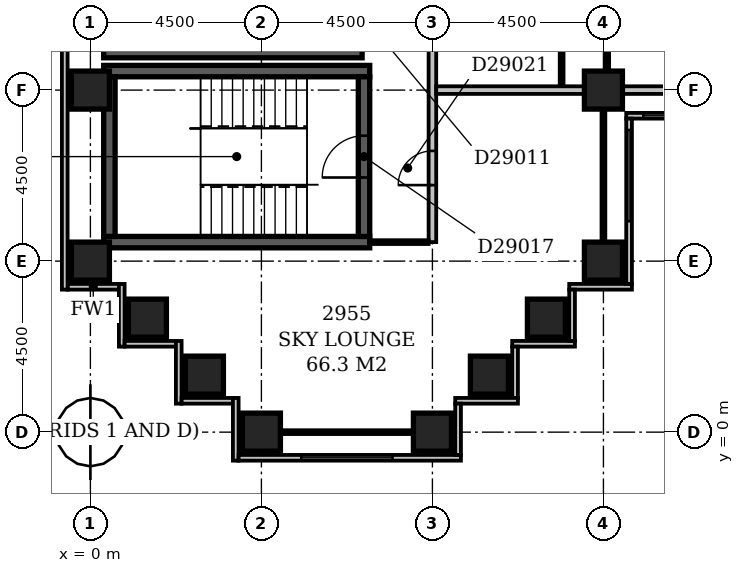
"""IFC4 building model, lengths in metres.
Left out: names, types, materials, properties, quantities, classifications, styles, units other than length and angle.
Written with IfcOpenShell. Run it as: python <this file> out.ifc"""

import sys

from ifc_helpers import new_model, si_unit, direction, frame, frame_2d, origin, origin_2d, place, context, subcontext, project, spatial, rectangle, extrude, element, fill, save


model = new_model("IFC4")
c1 = context("Model", 3, precision=1e-05, world=origin(), true_north=direction((0.0, 1.0)))
c2 = subcontext(c1, "Body", "Model", "MODEL_VIEW")
j1 = project(units=[si_unit("LENGTHUNIT", "METRE"), si_unit("PLANEANGLEUNIT", "RADIAN")], contexts=[c1])
p1 = place(None, origin())
s1 = spatial("IfcSite", under=j1, at=p1, CompositionType="ELEMENT")
p2 = place(p1, origin())
s2 = spatial("IfcBuilding", under=s1, at=p2, CompositionType="ELEMENT")
p3 = place(p2, frame((0.0, 0.0, 119.6)))
s3 = spatial("IfcBuildingStorey", under=s2, at=p3, CompositionType="ELEMENT", Elevation=119.6)
for number, where, z_axis, x_axis in (
    (1, (0.35, 5.0, -0.3), (0.0, 0.0, 1.0), (1.0, 0.0, 0.0)),
    (2, (0.35, 9.5, -0.3), (0.0, 0.0, 1.0), (1.0, 0.0, 0.0)),
):
    element("IfcWall", number, at=place(p3, frame(where, z_axis=z_axis, x_axis=x_axis)), inside=s3, PredefinedType="SHEAR", context=c2, shape_type="SweptSolid", body=[
        extrude(rectangle(XDim=7.0, YDim=0.3, at=frame_2d((3.5, 0.0))), origin(), (0.0, 0.0, 1.0), 3.6),
    ])
p4 = place(p3, frame((0.35, 10.0, -0.3), z_axis=(0.0, 0.0, 1.0), x_axis=(1.0, 0.0, 0.0)))
e3 = element("IfcWall", 3, at=p4, inside=s3, PredefinedType="SHEAR", context=c2, shape_type="SweptSolid", body=[
    extrude(rectangle(XDim=6.8, YDim=0.3, at=frame_2d((3.4, 0.0))), origin(), (0.0, 0.0, 1.0), 3.6),
])
p5 = place(p3, frame((0.5, 5.15, -0.3), z_axis=(0.0, 0.0, 1.0), x_axis=(0.0, 1.0, 0.0)))
e4 = element("IfcWall", 4, at=p5, inside=s3, PredefinedType="SHEAR", context=c2, shape_type="SweptSolid", body=[
    extrude(rectangle(XDim=4.2, YDim=0.3, at=frame_2d((2.1, 0.0))), origin(), (0.0, 0.0, 1.0), 3.6),
])
p6 = place(p3, frame((7.2, 5.15, -0.3), z_axis=(0.0, 0.0, 1.0), x_axis=(0.0, 1.0, 0.0)))
e5 = element("IfcWall", 5, at=p6, inside=s3, PredefinedType="SHEAR", context=c2, shape_type="SweptSolid", body=[
    extrude(rectangle(XDim=4.2, YDim=0.3, at=frame_2d((2.1, 0.0))), origin(), (0.0, 0.0, 1.0), 3.6),
])
p7 = place(p6, frame((1.55, 0.0, 0.3)))
e6 = element("IfcOpeningElement", 6, at=p7, cuts=e5, PredefinedType="OPENING", context=c2, shape_type="SweptSolid", body=[
    extrude(rectangle(XDim=1.1, YDim=2.1, at=frame_2d((0.55, 1.05))), frame((0.0, 0.162, 0.0), z_axis=(0.0, -1.0, 0.0), x_axis=(1.0, 0.0, 0.0)), (0.0, 0.0, 1.0), 0.324),
])
for number, where, z_axis, x_axis in (
    (7, (4.5, 0.0, -0.3), (0.0, 0.0, 1.0), (1.0, 0.0, 0.0)),
    (8, (9.0, 0.0, -0.3), (0.0, 0.0, 1.0), (1.0, 0.0, 0.0)),
    (9, (3.0, 1.5, -0.3), (0.0, 0.0, 1.0), (1.0, 0.0, 0.0)),
    (10, (10.5, 1.5, -0.3), (0.0, 0.0, 1.0), (1.0, 0.0, 0.0)),
    (11, (1.5, 3.0, -0.3), (0.0, 0.0, 1.0), (1.0, 0.0, 0.0)),
    (12, (12.0, 3.0, -0.3), (0.0, 0.0, 1.0), (1.0, 0.0, 0.0)),
    (13, (0.0, 4.5, -0.3), (0.0, 0.0, 1.0), (1.0, 0.0, 0.0)),
    (14, (13.5, 4.5, -0.3), (0.0, 0.0, 1.0), (1.0, 0.0, 0.0)),
    (15, (0.0, 9.0, -0.3), (0.0, 0.0, 1.0), (1.0, 0.0, 0.0)),
    (16, (13.5, 9.0, -0.3), (0.0, 0.0, 1.0), (1.0, 0.0, 0.0)),
):
    element("IfcColumn", number, at=place(p3, frame(where, z_axis=z_axis, x_axis=x_axis)), inside=s3, PredefinedType="COLUMN", context=c2, shape_type="SweptSolid", body=[
        extrude(rectangle(XDim=1.0, YDim=1.0, at=origin_2d()), origin(), (0.0, 0.0, 1.0), 3.6),
    ])
p8 = place(p3, frame((9.675, -0.6, 0.0), z_axis=(0.0, 0.0, 1.0), x_axis=(0.0, 1.0, 0.0)))
e17 = element("IfcWall", 17, at=p8, inside=s3, PredefinedType="STANDARD", context=c2, shape_type="SweptSolid", body=[
    extrude(rectangle(XDim=1.35, YDim=0.15, at=frame_2d((0.675, 0.0))), origin(), (0.0, 0.0, 1.0), 2.7),
])
p9 = place(p3, frame((9.6, 0.825, 0.0), z_axis=(0.0, 0.0, 1.0), x_axis=(1.0, 0.0, 0.0)))
e18 = element("IfcWall", 18, at=p9, inside=s3, PredefinedType="STANDARD", context=c2, shape_type="SweptSolid", body=[
    extrude(rectangle(XDim=1.65, YDim=0.15, at=frame_2d((0.825, 0.0))), origin(), (0.0, 0.0, 1.0), 2.7),
])
p10 = place(p3, frame((11.175, 0.9, 0.0), z_axis=(0.0, 0.0, 1.0), x_axis=(0.0, 1.0, 0.0)))
e19 = element("IfcWall", 19, at=p10, inside=s3, PredefinedType="STANDARD", context=c2, shape_type="SweptSolid", body=[
    extrude(rectangle(XDim=1.35, YDim=0.15, at=frame_2d((0.675, 0.0))), origin(), (0.0, 0.0, 1.0), 2.7),
])
p11 = place(p3, frame((11.1, 2.325, 0.0), z_axis=(0.0, 0.0, 1.0), x_axis=(1.0, 0.0, 0.0)))
e20 = element("IfcWall", 20, at=p11, inside=s3, PredefinedType="STANDARD", context=c2, shape_type="SweptSolid", body=[
    extrude(rectangle(XDim=1.65, YDim=0.15, at=frame_2d((0.825, 0.0))), origin(), (0.0, 0.0, 1.0), 2.7),
])
p12 = place(p3, frame((12.675, 2.4, 0.0), z_axis=(0.0, 0.0, 1.0), x_axis=(0.0, 1.0, 0.0)))
e21 = element("IfcWall", 21, at=p12, inside=s3, PredefinedType="STANDARD", context=c2, shape_type="SweptSolid", body=[
    extrude(rectangle(XDim=1.35, YDim=0.15, at=frame_2d((0.675, 0.0))), origin(), (0.0, 0.0, 1.0), 2.7),
])
p13 = place(p3, frame((12.6, 3.825, 0.0), z_axis=(0.0, 0.0, 1.0), x_axis=(1.0, 0.0, 0.0)))
e22 = element("IfcWall", 22, at=p13, inside=s3, PredefinedType="STANDARD", context=c2, shape_type="SweptSolid", body=[
    extrude(rectangle(XDim=1.65, YDim=0.15, at=frame_2d((0.825, 0.0))), origin(), (0.0, 0.0, 1.0), 2.7),
])
p14 = place(p3, frame((14.175, 3.9, 0.0), z_axis=(0.0, 0.0, 1.0), x_axis=(0.0, 1.0, 0.0)))
e23 = element("IfcWall", 23, at=p14, inside=s3, PredefinedType="STANDARD", context=c2, shape_type="SweptSolid", body=[
    extrude(rectangle(XDim=4.35, YDim=0.15, at=frame_2d((2.175, 0.0))), origin(), (0.0, 0.0, 1.0), 2.7),
])
p15 = place(p14, frame((1.65, 0.0, 0.6)))
e24 = element("IfcOpeningElement", 24, at=p15, cuts=e23, PredefinedType="OPENING", context=c2, shape_type="SweptSolid", body=[
    extrude(rectangle(XDim=2.4, YDim=1.8, at=frame_2d((1.2, 0.9))), frame((0.0, 0.087, 0.0), z_axis=(0.0, -1.0, 0.0), x_axis=(1.0, 0.0, 0.0)), (0.0, 0.0, 1.0), 0.174),
])
p16 = place(p3, frame((14.1, 8.325, 0.0), z_axis=(0.0, 0.0, 1.0), x_axis=(1.0, 0.0, 0.0)))
e25 = element("IfcWall", 25, at=p16, inside=s3, PredefinedType="STANDARD", context=c2, shape_type="SweptSolid", body=[
    extrude(rectangle(XDim=4.65, YDim=0.15, at=frame_2d((2.325, 0.0))), origin(), (0.0, 0.0, 1.0), 2.7),
])
p17 = place(p16, frame((0.45, 0.0, 0.6)))
e26 = element("IfcOpeningElement", 26, at=p17, cuts=e25, PredefinedType="OPENING", context=c2, shape_type="SweptSolid", body=[
    extrude(rectangle(XDim=2.4, YDim=1.8, at=frame_2d((1.2, 0.9))), frame((0.0, 0.087, 0.0), z_axis=(0.0, -1.0, 0.0), x_axis=(1.0, 0.0, 0.0)), (0.0, 0.0, 1.0), 0.174),
])
p18 = place(p3, frame((-0.675, 59.1, 0.0), z_axis=(0.0, 0.0, 1.0), x_axis=(0.0, -1.0, 0.0)))
e27 = element("IfcWall", 27, at=p18, inside=s3, PredefinedType="STANDARD", context=c2, shape_type="SweptSolid", body=[
    extrude(rectangle(XDim=55.35, YDim=0.15, at=frame_2d((27.675, 0.0))), origin(), (0.0, 0.0, 1.0), 2.7),
])
p19 = place(p18, frame((43.347, 0.0, 0.6)))
e28 = element("IfcOpeningElement", 28, at=p19, cuts=e27, PredefinedType="OPENING", context=c2, shape_type="SweptSolid", body=[
    extrude(rectangle(XDim=1.5, YDim=1.8, at=frame_2d((0.75, 0.9))), frame((0.0, 0.087, 0.0), z_axis=(0.0, -1.0, 0.0), x_axis=(1.0, 0.0, 0.0)), (0.0, 0.0, 1.0), 0.174),
])
p20 = place(p3, frame((-0.6, 3.825, 0.0), z_axis=(0.0, 0.0, 1.0), x_axis=(1.0, 0.0, 0.0)))
e29 = element("IfcWall", 29, at=p20, inside=s3, PredefinedType="STANDARD", context=c2, shape_type="SweptSolid", body=[
    extrude(rectangle(XDim=1.35, YDim=0.15, at=frame_2d((0.675, 0.0))), origin(), (0.0, 0.0, 1.0), 2.7),
])
p21 = place(p3, frame((0.825, 3.9, 0.0), z_axis=(0.0, 0.0, 1.0), x_axis=(0.0, -1.0, 0.0)))
e30 = element("IfcWall", 30, at=p21, inside=s3, PredefinedType="STANDARD", context=c2, shape_type="SweptSolid", body=[
    extrude(rectangle(XDim=1.65, YDim=0.15, at=frame_2d((0.825, 0.0))), origin(), (0.0, 0.0, 1.0), 2.7),
])
p22 = place(p3, frame((0.9, 2.325, 0.0), z_axis=(0.0, 0.0, 1.0), x_axis=(1.0, 0.0, 0.0)))
e31 = element("IfcWall", 31, at=p22, inside=s3, PredefinedType="STANDARD", context=c2, shape_type="SweptSolid", body=[
    extrude(rectangle(XDim=1.35, YDim=0.15, at=frame_2d((0.675, 0.0))), origin(), (0.0, 0.0, 1.0), 2.7),
])
p23 = place(p3, frame((2.325, 2.4, 0.0), z_axis=(0.0, 0.0, 1.0), x_axis=(0.0, -1.0, 0.0)))
e32 = element("IfcWall", 32, at=p23, inside=s3, PredefinedType="STANDARD", context=c2, shape_type="SweptSolid", body=[
    extrude(rectangle(XDim=1.65, YDim=0.15, at=frame_2d((0.825, 0.0))), origin(), (0.0, 0.0, 1.0), 2.7),
])
p24 = place(p3, frame((2.4, 0.825, 0.0), z_axis=(0.0, 0.0, 1.0), x_axis=(1.0, 0.0, 0.0)))
e33 = element("IfcWall", 33, at=p24, inside=s3, PredefinedType="STANDARD", context=c2, shape_type="SweptSolid", body=[
    extrude(rectangle(XDim=1.35, YDim=0.15, at=frame_2d((0.675, 0.0))), origin(), (0.0, 0.0, 1.0), 2.7),
])
p25 = place(p3, frame((3.825, 0.9, 0.0), z_axis=(0.0, 0.0, 1.0), x_axis=(0.0, -1.0, 0.0)))
e34 = element("IfcWall", 34, at=p25, inside=s3, PredefinedType="STANDARD", context=c2, shape_type="SweptSolid", body=[
    extrude(rectangle(XDim=1.65, YDim=0.15, at=frame_2d((0.825, 0.0))), origin(), (0.0, 0.0, 1.0), 2.7),
])
p26 = place(p3, frame((3.9, -0.675, 0.0), z_axis=(0.0, 0.0, 1.0), x_axis=(1.0, 0.0, 0.0)))
e35 = element("IfcWall", 35, at=p26, inside=s3, PredefinedType="STANDARD", context=c2, shape_type="SweptSolid", body=[
    extrude(rectangle(XDim=5.85, YDim=0.15, at=frame_2d((2.925, 0.0))), origin(), (0.0, 0.0, 1.0), 2.7),
])
p27 = place(p26, frame((1.65, 0.0, 0.6)))
e36 = element("IfcOpeningElement", 36, at=p27, cuts=e35, PredefinedType="OPENING", context=c2, shape_type="SweptSolid", body=[
    extrude(rectangle(XDim=2.4, YDim=1.8, at=frame_2d((1.2, 0.9))), frame((0.0, 0.087, 0.0), z_axis=(0.0, -1.0, 0.0), x_axis=(1.0, 0.0, 0.0)), (0.0, 0.0, 1.0), 0.174),
])
p28 = place(p3, frame((5.0, 0.0, 0.0), z_axis=(0.0, 0.0, 1.0), x_axis=(1.0, 0.0, 0.0)))
e37 = element("IfcWall", 37, at=p28, inside=s3, PredefinedType="PARTITIONING", context=c2, shape_type="SweptSolid", body=[
    extrude(rectangle(XDim=3.5, YDim=0.1, at=frame_2d((1.75, 0.0))), origin(), (0.0, 0.0, 1.0), 2.7),
])
p29 = place(p3, frame((0.0, 4.5, 0.0), z_axis=(0.0, 0.0, 1.0), x_axis=(0.0, 1.0, 0.0)))
e38 = element("IfcWall", 38, at=p29, inside=s3, PredefinedType="PARTITIONING", context=c2, shape_type="SweptSolid", body=[
    extrude(rectangle(XDim=0.5, YDim=0.1, at=frame_2d((0.25, 0.0))), origin(), (0.0, 0.0, 1.0), 2.7),
])
p30 = place(p3, frame((7.349, 5.0, 0.0), z_axis=(0.0, 0.0, 1.0), x_axis=(1.0, 0.0, 0.0)))
e39 = element("IfcWall", 39, at=p30, inside=s3, PredefinedType="PARTITIONING", context=c2, shape_type="SweptSolid", body=[
    extrude(rectangle(XDim=1.551, YDim=0.1, at=frame_2d((0.775, 0.0))), origin(), (0.0, 0.0, 1.0), 3.3),
])
p31 = place(p3, frame((9.0, 5.0, 0.0), z_axis=(0.0, 0.0, 1.0), x_axis=(0.0, 1.0, 0.0)))
e40 = element("IfcWall", 40, at=p31, inside=s3, PredefinedType="PARTITIONING", context=c2, shape_type="SweptSolid", body=[
    extrude(rectangle(XDim=27.75, YDim=0.2, at=frame_2d((13.875, 0.0))), origin(), (0.0, 0.0, 1.0), 3.3),
])
p32 = place(p31, frame((17.8, 0.0, 0.0)))
e41 = element("IfcOpeningElement", 41, at=p32, cuts=e40, PredefinedType="OPENING", context=c2, shape_type="SweptSolid", body=[
    extrude(rectangle(XDim=1.0, YDim=2.1, at=frame_2d((0.5, 1.05))), frame((0.0, 0.112, 0.0), z_axis=(0.0, -1.0, 0.0), x_axis=(1.0, 0.0, 0.0)), (0.0, 0.0, 1.0), 0.224),
])
p33 = place(p31, frame((14.95, 0.0, 0.0)))
e42 = element("IfcOpeningElement", 42, at=p33, cuts=e40, PredefinedType="OPENING", context=c2, shape_type="SweptSolid", body=[
    extrude(rectangle(XDim=1.0, YDim=2.1, at=frame_2d((0.5, 1.05))), frame((0.0, 0.112, 0.0), z_axis=(0.0, -1.0, 0.0), x_axis=(1.0, 0.0, 0.0)), (0.0, 0.0, 1.0), 0.224),
])
p34 = place(p31, frame((9.3, 0.0, 0.0)))
e43 = element("IfcOpeningElement", 43, at=p34, cuts=e40, PredefinedType="OPENING", context=c2, shape_type="SweptSolid", body=[
    extrude(rectangle(XDim=1.0, YDim=2.1, at=frame_2d((0.5, 1.05))), frame((0.0, 0.112, 0.0), z_axis=(0.0, -1.0, 0.0), x_axis=(1.0, 0.0, 0.0)), (0.0, 0.0, 1.0), 0.224),
])
p35 = place(p31, frame((1.5, 0.0, 0.0)))
e44 = element("IfcOpeningElement", 44, at=p35, cuts=e40, PredefinedType="OPENING", context=c2, shape_type="SweptSolid", body=[
    extrude(rectangle(XDim=0.9, YDim=2.1, at=frame_2d((0.45, 1.05))), frame((0.0, 0.112, 0.0), z_axis=(0.0, -1.0, 0.0), x_axis=(1.0, 0.0, 0.0)), (0.0, 0.0, 1.0), 0.224),
])
p36 = place(p3, frame((13.5, 5.0, 0.0), z_axis=(0.0, 0.0, 1.0), x_axis=(0.0, 1.0, 0.0)))
e45 = element("IfcWall", 45, at=p36, inside=s3, PredefinedType="PARTITIONING", context=c2, shape_type="SweptSolid", body=[
    extrude(rectangle(XDim=3.5, YDim=0.1, at=frame_2d((1.75, 0.0))), origin(), (0.0, 0.0, 1.0), 2.7),
])
p37 = place(p3, frame((9.1, 9.0, 0.0), z_axis=(0.0, 0.0, 1.0), x_axis=(1.0, 0.0, 0.0)))
e46 = element("IfcWall", 46, at=p37, inside=s3, PredefinedType="PARTITIONING", context=c2, shape_type="SweptSolid", body=[
    extrude(rectangle(XDim=3.9, YDim=0.2, at=frame_2d((1.95, 0.0))), origin(), (0.0, 0.0, 1.0), 3.3),
])
p38 = place(p3, frame((14.0, 9.0, 0.0), z_axis=(0.0, 0.0, 1.0), x_axis=(1.0, 0.0, 0.0)))
e47 = element("IfcWall", 47, at=p38, inside=s3, PredefinedType="PARTITIONING", context=c2, shape_type="SweptSolid", body=[
    extrude(rectangle(XDim=3.5, YDim=0.2, at=frame_2d((1.75, 0.0))), origin(), (0.0, 0.0, 1.0), 2.7),
])
p39 = place(p3, frame((12.4, 9.1, 0.0), z_axis=(0.0, 0.0, 1.0), x_axis=(0.0, 1.0, 0.0)))
e48 = element("IfcWall", 48, at=p39, inside=s3, PredefinedType="PARTITIONING", context=c2, shape_type="SweptSolid", body=[
    extrude(rectangle(XDim=4.9, YDim=0.1, at=frame_2d((2.45, 0.0))), origin(), (0.0, 0.0, 1.0), 3.3),
])
p40 = place(p39, frame((1.95, 0.0, 0.0)))
e49 = element("IfcOpeningElement", 49, at=p40, cuts=e48, PredefinedType="OPENING", context=c2, shape_type="SweptSolid", body=[
    extrude(rectangle(XDim=0.9, YDim=2.1, at=frame_2d((0.45, 1.05))), frame((0.0, 0.062, 0.0), z_axis=(0.0, -1.0, 0.0), x_axis=(1.0, 0.0, 0.0)), (0.0, 0.0, 1.0), 0.124),
])
p41 = place(p3, frame((13.6, 9.5, 0.0), z_axis=(0.0, 0.0, 1.0), x_axis=(0.0, 1.0, 0.0)))
e50 = element("IfcWall", 50, at=p41, inside=s3, PredefinedType="PARTITIONING", context=c2, shape_type="SweptSolid", body=[
    extrude(rectangle(XDim=8.4, YDim=0.1, at=frame_2d((4.2, 0.0))), origin(), (0.0, 0.0, 1.0), 3.3),
])
p42 = place(p41, frame((1.3, 0.0, 0.0)))
e51 = element("IfcOpeningElement", 51, at=p42, cuts=e50, PredefinedType="OPENING", context=c2, shape_type="SweptSolid", body=[
    extrude(rectangle(XDim=0.9, YDim=2.1, at=frame_2d((0.45, 1.05))), frame((0.0, 0.062, 0.0), z_axis=(0.0, -1.0, 0.0), x_axis=(1.0, 0.0, 0.0)), (0.0, 0.0, 1.0), 0.124),
])
p43 = place(p41, frame((5.8, 0.0, 0.0)))
e52 = element("IfcOpeningElement", 52, at=p43, cuts=e50, PredefinedType="OPENING", context=c2, shape_type="SweptSolid", body=[
    extrude(rectangle(XDim=0.9, YDim=2.1, at=frame_2d((0.45, 1.05))), frame((0.0, 0.062, 0.0), z_axis=(0.0, -1.0, 0.0), x_axis=(1.0, 0.0, 0.0)), (0.0, 0.0, 1.0), 0.124),
])
p44 = place(p15, origin())
e53 = element("IfcWindow", 53, at=p44, inside=s3, PartitioningType="SINGLE_PANEL", PredefinedType="WINDOW", context=c2, shape_type="SweptSolid", body=[
    extrude(rectangle(XDim=2.4, YDim=1.8, at=frame_2d((1.2, 0.9))), frame((0.0, 0.03, 0.0), z_axis=(0.0, -1.0, 0.0), x_axis=(1.0, 0.0, 0.0)), (0.0, 0.0, 1.0), 0.06),
])
fill(e24, e53)
p45 = place(p17, origin())
e54 = element("IfcWindow", 54, at=p45, inside=s3, PartitioningType="SINGLE_PANEL", PredefinedType="WINDOW", context=c2, shape_type="SweptSolid", body=[
    extrude(rectangle(XDim=2.4, YDim=1.8, at=frame_2d((1.2, 0.9))), frame((0.0, 0.03, 0.0), z_axis=(0.0, -1.0, 0.0), x_axis=(1.0, 0.0, 0.0)), (0.0, 0.0, 1.0), 0.06),
])
fill(e26, e54)
p46 = place(p27, origin())
e55 = element("IfcWindow", 55, at=p46, inside=s3, PartitioningType="SINGLE_PANEL", PredefinedType="WINDOW", context=c2, shape_type="SweptSolid", body=[
    extrude(rectangle(XDim=2.4, YDim=1.8, at=frame_2d((1.2, 0.9))), frame((0.0, 0.03, 0.0), z_axis=(0.0, -1.0, 0.0), x_axis=(1.0, 0.0, 0.0)), (0.0, 0.0, 1.0), 0.06),
])
fill(e36, e55)
p47 = place(p7, origin())
e56 = element("IfcDoor", 56, at=p47, inside=s3, OperationType="SINGLE_SWING_LEFT", PredefinedType="DOOR", context=c2, shape_type="SweptSolid", body=[
    extrude(rectangle(XDim=1.1, YDim=2.1, at=frame_2d((0.55, 1.05))), frame((0.0, 0.025, 0.0), z_axis=(0.0, -1.0, 0.0), x_axis=(1.0, 0.0, 0.0)), (0.0, 0.0, 1.0), 0.05),
])
fill(e6, e56)
p48 = place(p35, origin())
e57 = element("IfcDoor", 57, at=p48, inside=s3, OperationType="SINGLE_SWING_LEFT", PredefinedType="DOOR", context=c2, shape_type="SweptSolid", body=[
    extrude(rectangle(XDim=0.9, YDim=2.1, at=frame_2d((0.45, 1.05))), frame((0.0, 0.025, 0.0), z_axis=(0.0, -1.0, 0.0), x_axis=(1.0, 0.0, 0.0)), (0.0, 0.0, 1.0), 0.05),
])
fill(e44, e57)
save(model, sys.argv[1])
